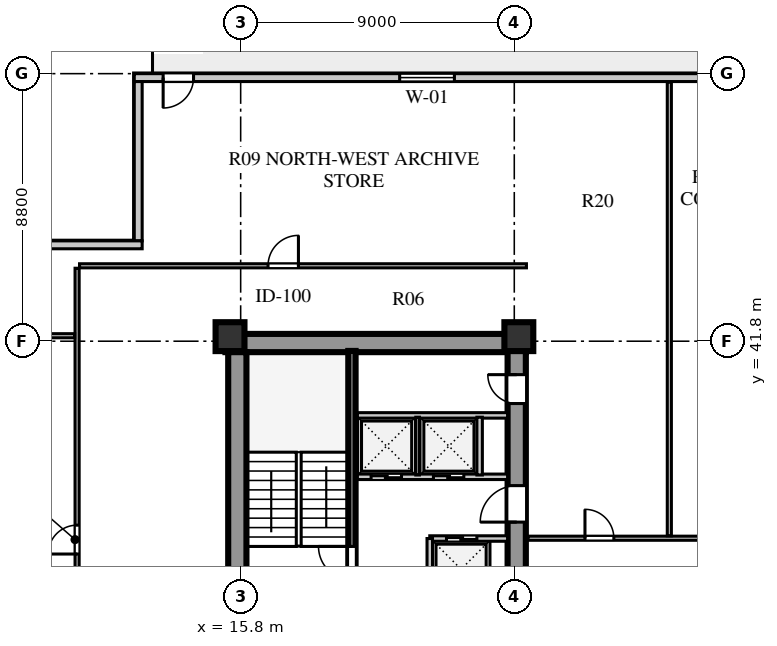
"""IFC4 building model, lengths in metres.
Left out: names, types, materials, properties, quantities, classifications, styles, units other than length and angle.
Written with IfcOpenShell. Run it as: python <this file> out.ifc"""

import sys

from ifc_helpers import new_model, si_unit, direction, frame, frame_2d, origin, origin_2d, place, context, subcontext, project, spatial, rectangle, extrude, element, fill, save


model = new_model("IFC4")
c1 = context("Model", 3, precision=1e-05, world=origin(), true_north=direction((0.0, 1.0)))
c2 = subcontext(c1, "Body", "Model", "MODEL_VIEW")
j1 = project(units=[si_unit("LENGTHUNIT", "METRE"), si_unit("PLANEANGLEUNIT", "RADIAN")], contexts=[c1])
p1 = place(None, origin())
s1 = spatial("IfcSite", under=j1, at=p1, CompositionType="ELEMENT")
p2 = place(p1, origin())
s2 = spatial("IfcBuilding", under=s1, at=p2, CompositionType="ELEMENT")
p3 = place(p2, frame((0.0, 0.0, 42.0)))
s3 = spatial("IfcBuildingStorey", under=s2, at=p3, CompositionType="ELEMENT", Elevation=42.0)
p4 = place(p3, frame((15.3, 41.74, 0.0), z_axis=(0.0, 0.0, 1.0), x_axis=(1.0, 0.0, 0.0)))
e1 = element("IfcWall", 1, at=p4, inside=s3, PredefinedType="SHEAR", context=c2, shape_type="SweptSolid", body=[
    extrude(rectangle(XDim=9.88, YDim=0.6, at=frame_2d((4.94, 0.0))), origin(), (0.0, 0.0, 1.0), 3.72),
])
p5 = place(p3, frame((15.69, 15.81, 0.0), z_axis=(0.0, 0.0, 1.0), x_axis=(0.0, 1.0, 0.0)))
e2 = element("IfcWall", 2, at=p5, inside=s3, PredefinedType="SHEAR", context=c2, shape_type="SweptSolid", body=[
    extrude(rectangle(XDim=25.63, YDim=0.6, at=frame_2d((12.815, 0.0))), origin(), (0.0, 0.0, 1.0), 3.72),
])
p6 = place(p3, frame((24.88, 15.74, 0.0), z_axis=(0.0, 0.0, 1.0), x_axis=(0.0, 1.0, 0.0)))
e3 = element("IfcWall", 3, at=p6, inside=s3, PredefinedType="SHEAR", context=c2, shape_type="SweptSolid", body=[
    extrude(rectangle(XDim=25.76, YDim=0.6, at=frame_2d((12.88, 0.0))), origin(), (0.0, 0.0, 1.0), 3.72),
])
p7 = place(p6, frame((1.61, 0.0, 0.0)))
e4 = element("IfcOpeningElement", 4, at=p7, cuts=e3, PredefinedType="OPENING", context=c2, shape_type="SweptSolid", body=[
    extrude(rectangle(XDim=1.2, YDim=2.1, at=frame_2d((0.6, 1.05))), frame((0.0, 0.31, 0.0), z_axis=(0.0, -1.0, 0.0), x_axis=(1.0, 0.0, 0.0)), (0.0, 0.0, 1.0), 0.62),
])
p8 = place(p6, frame((6.78, 0.0, 0.0)))
e5 = element("IfcOpeningElement", 5, at=p8, cuts=e3, PredefinedType="OPENING", context=c2, shape_type="SweptSolid", body=[
    extrude(rectangle(XDim=0.85, YDim=2.06, at=frame_2d((0.425, 1.03))), frame((0.0, 0.31, 0.0), z_axis=(0.0, -1.0, 0.0), x_axis=(1.0, 0.0, 0.0)), (0.0, 0.0, 1.0), 0.62),
])
p9 = place(p6, frame((12.11, 0.0, 0.0)))
e6 = element("IfcOpeningElement", 6, at=p9, cuts=e3, PredefinedType="OPENING", context=c2, shape_type="SweptSolid", body=[
    extrude(rectangle(XDim=1.5, YDim=2.12, at=frame_2d((0.75, 1.06))), frame((0.0, 0.31, 0.0), z_axis=(0.0, -1.0, 0.0), x_axis=(1.0, 0.0, 0.0)), (0.0, 0.0, 1.0), 0.62),
])
p10 = place(p6, frame((20.11, 0.0, 0.0)))
e7 = element("IfcOpeningElement", 7, at=p10, cuts=e3, PredefinedType="OPENING", context=c2, shape_type="SweptSolid", body=[
    extrude(rectangle(XDim=1.2, YDim=2.12, at=frame_2d((0.6, 1.06))), frame((0.0, 0.31, 0.0), z_axis=(0.0, -1.0, 0.0), x_axis=(1.0, 0.0, 0.0)), (0.0, 0.0, 1.0), 0.62),
])
p11 = place(p6, frame((24.01, 0.0, 0.0)))
e8 = element("IfcOpeningElement", 8, at=p11, cuts=e3, PredefinedType="OPENING", context=c2, shape_type="SweptSolid", body=[
    extrude(rectangle(XDim=0.95, YDim=2.1, at=frame_2d((0.475, 1.05))), frame((0.0, 0.31, 0.0), z_axis=(0.0, -1.0, 0.0), x_axis=(1.0, 0.0, 0.0)), (0.0, 0.0, 1.0), 0.62),
])
for number, where, z_axis, x_axis in (
    (9, (15.45, 41.95, 0.0), (0.0, 0.0, 1.0), (1.0, 0.0, 0.0)),
    (10, (24.95, 41.95, 0.0), (0.0, 0.0, 1.0), (1.0, 0.0, 0.0)),
):
    element("IfcColumn", number, at=place(p3, frame(where, z_axis=z_axis, x_axis=x_axis)), inside=s3, PredefinedType="COLUMN", context=c2, shape_type="SweptSolid", body=[
        extrude(rectangle(XDim=0.95, YDim=0.95, at=origin_2d()), origin(), (0.0, 0.0, 1.0), 3.72),
    ])
p12 = place(p3, frame((46.3, 50.47, 0.0), z_axis=(0.0, 0.0, 1.0), x_axis=(-1.0, 0.0, 0.0)))
e11 = element("IfcWall", 11, at=p12, inside=s3, PredefinedType="SOLIDWALL", context=c2, shape_type="SweptSolid", body=[
    extrude(rectangle(XDim=34.0, YDim=0.26, at=frame_2d((17.0, 0.0))), origin(), (0.0, 0.0, 1.0), 3.72),
])
p13 = place(p12, frame((32.05, 0.0, 0.0)))
e12 = element("IfcOpeningElement", 12, at=p13, cuts=e11, PredefinedType="OPENING", context=c2, shape_type="SweptSolid", body=[
    extrude(rectangle(XDim=1.0, YDim=2.05, at=frame_2d((0.5, 1.025))), frame((0.0, 0.14, 0.0), z_axis=(0.0, -1.0, 0.0), x_axis=(1.0, 0.0, 0.0)), (0.0, 0.0, 1.0), 0.28),
])
p14 = place(p12, frame((23.47, 0.0, 0.8)))
e13 = element("IfcOpeningElement", 13, at=p14, cuts=e11, PredefinedType="OPENING", context=c2, shape_type="SweptSolid", body=[
    extrude(rectangle(XDim=1.8, YDim=2.0, at=frame_2d((0.9, 1.0))), frame((0.0, 0.14, 0.0), z_axis=(0.0, -1.0, 0.0), x_axis=(1.0, 0.0, 0.0)), (0.0, 0.0, 1.0), 0.28),
])
p15 = place(p12, frame((7.505, 0.0, 0.8)))
e14 = element("IfcOpeningElement", 14, at=p15, cuts=e11, PredefinedType="OPENING", context=c2, shape_type="SweptSolid", body=[
    extrude(rectangle(XDim=1.5, YDim=2.0, at=frame_2d((0.75, 1.0))), frame((0.0, 0.14, 0.0), z_axis=(0.0, -1.0, 0.0), x_axis=(1.0, 0.0, 0.0)), (0.0, 0.0, 1.0), 0.28),
])
p16 = place(p3, frame((12.43, 50.34, 0.0), z_axis=(0.0, 0.0, 1.0), x_axis=(0.0, -1.0, 0.0)))
e15 = element("IfcWall", 15, at=p16, inside=s3, PredefinedType="SOLIDWALL", context=c2, shape_type="SweptSolid", body=[
    extrude(rectangle(XDim=5.24, YDim=0.26, at=frame_2d((2.62, 0.0))), origin(), (0.0, 0.0, 1.0), 3.72),
])
p17 = place(p3, frame((12.56, 44.97, 0.0), z_axis=(0.0, 0.0, 1.0), x_axis=(-1.0, 0.0, 0.0)))
e16 = element("IfcWall", 16, at=p17, inside=s3, PredefinedType="SOLIDWALL", context=c2, shape_type="SweptSolid", body=[
    extrude(rectangle(XDim=5.76, YDim=0.26, at=frame_2d((2.88, 0.0))), origin(), (0.0, 0.0, 1.0), 3.72),
])
p18 = place(p3, frame((19.46, 33.3, 0.0), z_axis=(0.0, 0.0, 1.0), x_axis=(0.0, 1.0, 0.0)))
e17 = element("IfcWall", 17, at=p18, inside=s3, PredefinedType="SHEAR", context=c2, shape_type="SweptSolid", body=[
    extrude(rectangle(XDim=8.18, YDim=0.24, at=frame_2d((4.09, 0.0))), origin(), (0.0, 0.0, 1.0), 4.0),
])
p19 = place(p18, frame((0.65, 0.0, 0.0)))
e18 = element("IfcOpeningElement", 18, at=p19, cuts=e17, PredefinedType="OPENING", context=c2, shape_type="SweptSolid", body=[
    extrude(rectangle(XDim=1.1, YDim=2.1, at=frame_2d((0.55, 1.05))), frame((0.0, 0.13, 0.0), z_axis=(0.0, -1.0, 0.0), x_axis=(1.0, 0.0, 0.0)), (0.0, 0.0, 1.0), 0.26),
])
p20 = place(p3, frame((22.02, 35.31, 0.0), z_axis=(0.0, 0.0, 1.0), x_axis=(1.0, 0.0, 0.0)))
e19 = element("IfcWall", 19, at=p20, inside=s3, PredefinedType="SOLIDWALL", context=c2, shape_type="SweptSolid", body=[
    extrude(rectangle(XDim=2.56, YDim=0.18, at=frame_2d((1.28, 0.0))), origin(), (0.0, 0.0, 1.0), 3.72),
])
p21 = place(p20, frame((0.55, 0.0, 0.0)))
e20 = element("IfcOpeningElement", 20, at=p21, cuts=e19, PredefinedType="OPENING", context=c2, shape_type="SweptSolid", body=[
    extrude(rectangle(XDim=1.0, YDim=2.1, at=frame_2d((0.5, 1.05))), frame((0.0, 0.1, 0.0), z_axis=(0.0, -1.0, 0.0), x_axis=(1.0, 0.0, 0.0)), (0.0, 0.0, 1.0), 0.2),
])
p22 = place(p3, frame((22.02, 33.3, 0.0), z_axis=(0.0, 0.0, 1.0), x_axis=(0.0, 1.0, 0.0)))
e21 = element("IfcWall", 21, at=p22, inside=s3, PredefinedType="SOLIDWALL", context=c2, shape_type="SweptSolid", body=[
    extrude(rectangle(XDim=2.01, YDim=0.18, at=frame_2d((1.005, 0.0))), origin(), (0.0, 0.0, 1.0), 3.72),
])
p23 = place(p3, frame((19.64, 37.34, 0.0), z_axis=(0.0, 0.0, 1.0), x_axis=(1.0, 0.0, 0.0)))
e22 = element("IfcWall", 22, at=p23, inside=s3, PredefinedType="SOLIDWALL", context=c2, shape_type="SweptSolid", body=[
    extrude(rectangle(XDim=4.94, YDim=0.18, at=frame_2d((2.47, 0.0))), origin(), (0.0, 0.0, 1.0), 3.72),
])
p24 = place(p23, frame((0.45, 0.0, 0.0)))
e23 = element("IfcOpeningElement", 23, at=p24, cuts=e22, PredefinedType="OPENING", context=c2, shape_type="SweptSolid", body=[
    extrude(rectangle(XDim=1.0, YDim=2.1, at=frame_2d((0.5, 1.05))), frame((0.0, 0.1, 0.0), z_axis=(0.0, -1.0, 0.0), x_axis=(1.0, 0.0, 0.0)), (0.0, 0.0, 1.0), 0.2),
])
p25 = place(p23, frame((2.5, 0.0, 0.0)))
e24 = element("IfcOpeningElement", 24, at=p25, cuts=e22, PredefinedType="OPENING", context=c2, shape_type="SweptSolid", body=[
    extrude(rectangle(XDim=1.0, YDim=2.1, at=frame_2d((0.5, 1.05))), frame((0.0, 0.1, 0.0), z_axis=(0.0, -1.0, 0.0), x_axis=(1.0, 0.0, 0.0)), (0.0, 0.0, 1.0), 0.2),
])
p26 = place(p3, frame((19.64, 39.36, 0.0), z_axis=(0.0, 0.0, 1.0), x_axis=(1.0, 0.0, 0.0)))
e25 = element("IfcWall", 25, at=p26, inside=s3, PredefinedType="SOLIDWALL", context=c2, shape_type="SweptSolid", body=[
    extrude(rectangle(XDim=4.94, YDim=0.18, at=frame_2d((2.47, 0.0))), origin(), (0.0, 0.0, 1.0), 3.72),
])
p27 = place(p3, frame((21.62, 37.4, 0.0), z_axis=(0.0, 0.0, 1.0), x_axis=(0.0, 1.0, 0.0)))
e26 = element("IfcWall", 26, at=p27, inside=s3, PredefinedType="PARTITIONING", context=c2, shape_type="SweptSolid", body=[
    extrude(rectangle(XDim=1.9, YDim=0.12, at=frame_2d((0.95, 0.0))), origin(), (0.0, 0.0, 1.0), 3.72),
])
p28 = place(p3, frame((23.66, 37.4, 0.0), z_axis=(0.0, 0.0, 1.0), x_axis=(0.0, 1.0, 0.0)))
e27 = element("IfcWall", 27, at=p28, inside=s3, PredefinedType="SOLIDWALL", context=c2, shape_type="SweptSolid", body=[
    extrude(rectangle(XDim=1.9, YDim=0.18, at=frame_2d((0.95, 0.0))), origin(), (0.0, 0.0, 1.0), 3.72),
])
p29 = place(p3, frame((25.25, 35.32, 0.0), z_axis=(0.0, 0.0, 1.0), x_axis=(1.0, 0.0, 0.0)))
e28 = element("IfcWall", 28, at=p29, inside=s3, PredefinedType="PARTITIONING", context=c2, shape_type="SweptSolid", body=[
    extrude(rectangle(XDim=9.47, YDim=0.135, at=frame_2d((4.735, 0.0))), origin(), (0.0, 0.0, 1.0), 3.72),
])
p30 = place(p29, frame((1.875, 0.0, 0.0)))
e29 = element("IfcOpeningElement", 29, at=p30, cuts=e28, PredefinedType="OPENING", context=c2, shape_type="SweptSolid", body=[
    extrude(rectangle(XDim=0.95, YDim=2.08, at=frame_2d((0.475, 1.04))), frame((0.0, 0.078, 0.0), z_axis=(0.0, -1.0, 0.0), x_axis=(1.0, 0.0, 0.0)), (0.0, 0.0, 1.0), 0.155),
])
p31 = place(p29, frame((6.565, 0.0, 0.0)))
e30 = element("IfcOpeningElement", 30, at=p31, cuts=e28, PredefinedType="OPENING", context=c2, shape_type="SweptSolid", body=[
    extrude(rectangle(XDim=0.95, YDim=2.08, at=frame_2d((0.475, 1.04))), frame((0.0, 0.078, 0.0), z_axis=(0.0, -1.0, 0.0), x_axis=(1.0, 0.0, 0.0)), (0.0, 0.0, 1.0), 0.155),
])
p32 = place(p3, frame((10.42, 13.0, 0.0), z_axis=(0.0, 0.0, 1.0), x_axis=(0.0, 1.0, 0.0)))
e31 = element("IfcWall", 31, at=p32, inside=s3, PredefinedType="PARTITIONING", context=c2, shape_type="SweptSolid", body=[
    extrude(rectangle(XDim=31.2, YDim=0.135, at=frame_2d((15.6, 0.0))), origin(), (0.0, 0.0, 1.0), 3.72),
])
p33 = place(p32, frame((8.5, 0.0, 0.0)))
e32 = element("IfcOpeningElement", 32, at=p33, cuts=e31, PredefinedType="OPENING", context=c2, shape_type="SweptSolid", body=[
    extrude(rectangle(XDim=0.95, YDim=2.08, at=frame_2d((0.475, 1.04))), frame((0.0, 0.078, 0.0), z_axis=(0.0, -1.0, 0.0), x_axis=(1.0, 0.0, 0.0)), (0.0, 0.0, 1.0), 0.155),
])
p34 = place(p32, frame((21.8, 0.0, 0.0)))
e33 = element("IfcOpeningElement", 33, at=p34, cuts=e31, PredefinedType="OPENING", context=c2, shape_type="SweptSolid", body=[
    extrude(rectangle(XDim=0.95, YDim=2.08, at=frame_2d((0.475, 1.04))), frame((0.0, 0.078, 0.0), z_axis=(0.0, -1.0, 0.0), x_axis=(1.0, 0.0, 0.0)), (0.0, 0.0, 1.0), 0.155),
])
p35 = place(p3, frame((7.08, 41.98, 0.0), z_axis=(0.0, 0.0, 1.0), x_axis=(1.0, 0.0, 0.0)))
e34 = element("IfcWall", 34, at=p35, inside=s3, PredefinedType="PARTITIONING", context=c2, shape_type="SweptSolid", body=[
    extrude(rectangle(XDim=3.26, YDim=0.135, at=frame_2d((1.63, 0.0))), origin(), (0.0, 0.0, 1.0), 3.22),
])
p36 = place(p3, frame((10.5, 44.28, 0.0), z_axis=(0.0, 0.0, 1.0), x_axis=(1.0, 0.0, 0.0)))
e35 = element("IfcWall", 35, at=p36, inside=s3, PredefinedType="PARTITIONING", context=c2, shape_type="SweptSolid", body=[
    extrude(rectangle(XDim=14.7, YDim=0.135, at=frame_2d((7.35, 0.0))), origin(), (0.0, 0.0, 1.0), 3.72),
])
p37 = place(p36, frame((6.2, 0.0, 0.0)))
e36 = element("IfcOpeningElement", 36, at=p37, cuts=e35, PredefinedType="OPENING", context=c2, shape_type="SweptSolid", body=[
    extrude(rectangle(XDim=1.0, YDim=2.08, at=frame_2d((0.5, 1.04))), frame((0.0, 0.078, 0.0), z_axis=(0.0, -1.0, 0.0), x_axis=(1.0, 0.0, 0.0)), (0.0, 0.0, 1.0), 0.155),
])
p38 = place(p3, frame((29.9, 35.4, 0.0), z_axis=(0.0, 0.0, 1.0), x_axis=(0.0, 1.0, 0.0)))
e37 = element("IfcWall", 37, at=p38, inside=s3, PredefinedType="PARTITIONING", context=c2, shape_type="SweptSolid", body=[
    extrude(rectangle(XDim=14.92, YDim=0.135, at=frame_2d((7.46, 0.0))), origin(), (0.0, 0.0, 1.0), 3.72),
])
p39 = place(p13, frame((1.0, 0.0, 0.0), z_axis=(0.0, 0.0, 1.0), x_axis=(-1.0, 0.0, 0.0)))
e38 = element("IfcDoor", 38, at=p39, inside=s3, OperationType="SINGLE_SWING_LEFT", PredefinedType="DOOR", context=c2, shape_type="SweptSolid", body=[
    extrude(rectangle(XDim=1.0, YDim=2.05, at=frame_2d((0.5, 1.025))), frame((0.0, 0.025, 0.0), z_axis=(0.0, -1.0, 0.0), x_axis=(1.0, 0.0, 0.0)), (0.0, 0.0, 1.0), 0.05),
])
fill(e12, e38)
p40 = place(p14, origin())
e39 = element("IfcWindow", 39, at=p40, inside=s3, PartitioningType="SINGLE_PANEL", PredefinedType="WINDOW", context=c2, shape_type="SweptSolid", body=[
    extrude(rectangle(XDim=1.8, YDim=2.0, at=frame_2d((0.9, 1.0))), frame((0.0, 0.03, 0.0), z_axis=(0.0, -1.0, 0.0), x_axis=(1.0, 0.0, 0.0)), (0.0, 0.0, 1.0), 0.06),
])
fill(e13, e39)
p41 = place(p19, origin())
e40 = element("IfcDoor", 40, at=p41, inside=s3, OperationType="SINGLE_SWING_RIGHT", PredefinedType="DOOR", context=c2, shape_type="SweptSolid", body=[
    extrude(rectangle(XDim=1.1, YDim=2.1, at=frame_2d((0.55, 1.05))), frame((0.0, 0.025, 0.0), z_axis=(0.0, -1.0, 0.0), x_axis=(1.0, 0.0, 0.0)), (0.0, 0.0, 1.0), 0.05),
])
fill(e18, e40)
p42 = place(p10, frame((1.2, 0.0, 0.0), z_axis=(0.0, 0.0, 1.0), x_axis=(-1.0, 0.0, 0.0)))
e41 = element("IfcDoor", 41, at=p42, inside=s3, OperationType="SINGLE_SWING_RIGHT", PredefinedType="DOOR", context=c2, shape_type="SweptSolid", body=[
    extrude(rectangle(XDim=1.2, YDim=2.12, at=frame_2d((0.6, 1.06))), frame((0.0, 0.025, 0.0), z_axis=(0.0, -1.0, 0.0), x_axis=(1.0, 0.0, 0.0)), (0.0, 0.0, 1.0), 0.05),
])
fill(e7, e41)
p43 = place(p24, frame((1.0, 0.0, 0.0), z_axis=(0.0, 0.0, 1.0), x_axis=(-1.0, 0.0, 0.0)))
e42 = element("IfcDoor", 42, at=p43, inside=s3, OperationType="DOUBLE_DOOR_SLIDING", PredefinedType="DOOR", context=c2, shape_type="SweptSolid", body=[
    extrude(rectangle(XDim=1.0, YDim=2.1, at=frame_2d((0.5, 1.05))), frame((0.0, 0.025, 0.0), z_axis=(0.0, -1.0, 0.0), x_axis=(1.0, 0.0, 0.0)), (0.0, 0.0, 1.0), 0.05),
])
fill(e23, e42)
p44 = place(p25, frame((1.0, 0.0, 0.0), z_axis=(0.0, 0.0, 1.0), x_axis=(-1.0, 0.0, 0.0)))
e43 = element("IfcDoor", 43, at=p44, inside=s3, OperationType="DOUBLE_DOOR_SLIDING", PredefinedType="DOOR", context=c2, shape_type="SweptSolid", body=[
    extrude(rectangle(XDim=1.0, YDim=2.1, at=frame_2d((0.5, 1.05))), frame((0.0, 0.025, 0.0), z_axis=(0.0, -1.0, 0.0), x_axis=(1.0, 0.0, 0.0)), (0.0, 0.0, 1.0), 0.05),
])
fill(e24, e43)
p45 = place(p21, origin())
e44 = element("IfcDoor", 44, at=p45, inside=s3, OperationType="DOUBLE_DOOR_SLIDING", PredefinedType="DOOR", context=c2, shape_type="SweptSolid", body=[
    extrude(rectangle(XDim=1.0, YDim=2.1, at=frame_2d((0.5, 1.05))), frame((0.0, 0.025, 0.0), z_axis=(0.0, -1.0, 0.0), x_axis=(1.0, 0.0, 0.0)), (0.0, 0.0, 1.0), 0.05),
])
fill(e20, e44)
p46 = place(p11, frame((0.95, 0.0, 0.0), z_axis=(0.0, 0.0, 1.0), x_axis=(-1.0, 0.0, 0.0)))
e45 = element("IfcDoor", 45, at=p46, inside=s3, OperationType="SINGLE_SWING_LEFT", PredefinedType="DOOR", context=c2, shape_type="SweptSolid", body=[
    extrude(rectangle(XDim=0.95, YDim=2.1, at=frame_2d((0.475, 1.05))), frame((0.0, 0.025, 0.0), z_axis=(0.0, -1.0, 0.0), x_axis=(1.0, 0.0, 0.0)), (0.0, 0.0, 1.0), 0.05),
])
fill(e8, e45)
p47 = place(p37, origin())
e46 = element("IfcDoor", 46, at=p47, inside=s3, OperationType="SINGLE_SWING_RIGHT", PredefinedType="DOOR", context=c2, shape_type="SweptSolid", body=[
    extrude(rectangle(XDim=1.0, YDim=2.08, at=frame_2d((0.5, 1.04))), frame((0.0, 0.025, 0.0), z_axis=(0.0, -1.0, 0.0), x_axis=(1.0, 0.0, 0.0)), (0.0, 0.0, 1.0), 0.05),
])
fill(e36, e46)
p48 = place(p34, frame((0.95, 0.0, 0.0), z_axis=(0.0, 0.0, 1.0), x_axis=(-1.0, 0.0, 0.0)))
e47 = element("IfcDoor", 47, at=p48, inside=s3, OperationType="SINGLE_SWING_RIGHT", PredefinedType="DOOR", context=c2, shape_type="SweptSolid", body=[
    extrude(rectangle(XDim=0.95, YDim=2.08, at=frame_2d((0.475, 1.04))), frame((0.0, 0.025, 0.0), z_axis=(0.0, -1.0, 0.0), x_axis=(1.0, 0.0, 0.0)), (0.0, 0.0, 1.0), 0.05),
])
fill(e33, e47)
p49 = place(p30, origin())
e48 = element("IfcDoor", 48, at=p49, inside=s3, OperationType="SINGLE_SWING_LEFT", PredefinedType="DOOR", context=c2, shape_type="SweptSolid", body=[
    extrude(rectangle(XDim=0.95, YDim=2.08, at=frame_2d((0.475, 1.04))), frame((0.0, 0.025, 0.0), z_axis=(0.0, -1.0, 0.0), x_axis=(1.0, 0.0, 0.0)), (0.0, 0.0, 1.0), 0.05),
])
fill(e29, e48)
save(model, sys.argv[1])
